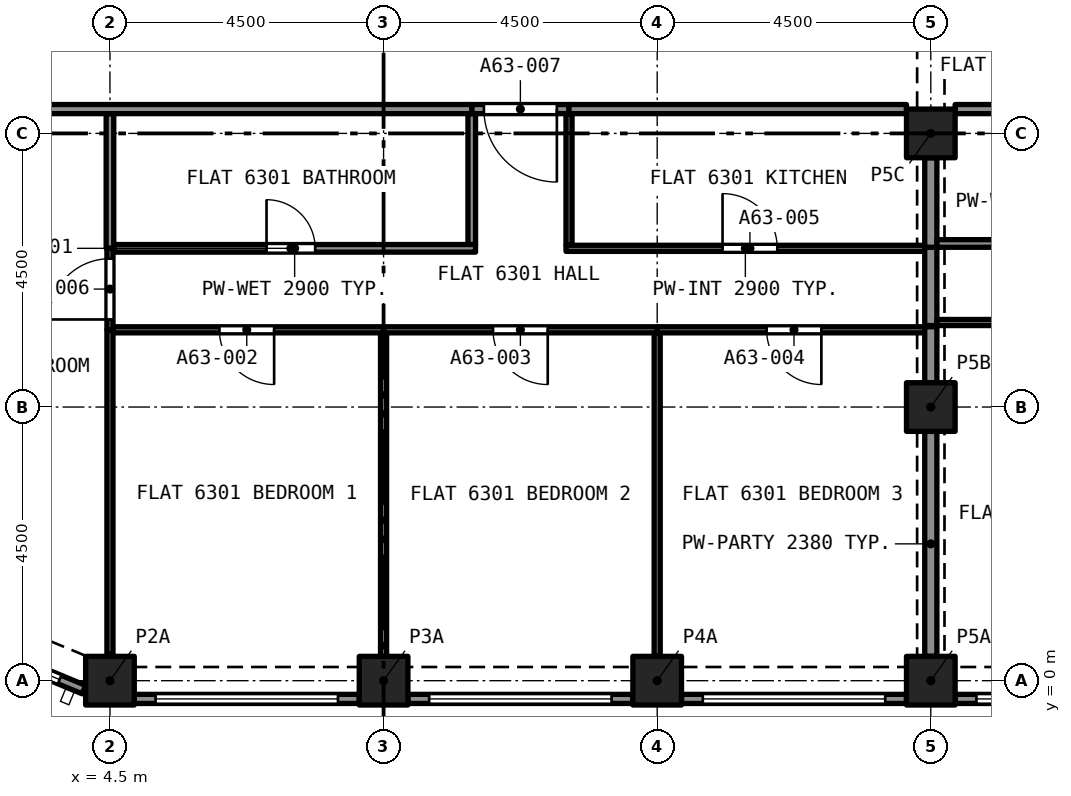
"""IFC4 building model, lengths in metres.
Left out: names, types, materials, properties, quantities, classifications, styles, units other than length and angle.
Written with IfcOpenShell. Run it as: python <this file> out.ifc"""

import sys

from ifc_helpers import new_model, si_unit, direction, frame, frame_2d, origin, origin_2d, place, context, subcontext, project, spatial, rectangle, extrude, element, fill, save


model = new_model("IFC4")
c1 = context("Model", 3, precision=1e-05, world=origin(), true_north=direction((0.0, 1.0)))
c2 = subcontext(c1, "Body", "Model", "MODEL_VIEW")
j1 = project(units=[si_unit("LENGTHUNIT", "METRE"), si_unit("PLANEANGLEUNIT", "RADIAN")], contexts=[c1])
p1 = place(None, origin())
s1 = spatial("IfcSite", under=j1, at=p1, CompositionType="ELEMENT")
p2 = place(p1, origin())
s2 = spatial("IfcBuilding", under=s1, at=p2, CompositionType="ELEMENT")
p3 = place(p2, frame((0.0, 0.0, 226.095)))
s3 = spatial("IfcBuildingStorey", under=s2, at=p3, CompositionType="ELEMENT", Elevation=226.095)
for number, where, z_axis, x_axis in (
    (1, (4.5, 0.0, 0.0), (0.0, 0.0, 1.0), (1.0, 0.0, 0.0)),
    (2, (9.0, 0.0, 0.0), (0.0, 0.0, 1.0), (1.0, 0.0, 0.0)),
    (3, (13.5, 0.0, 0.0), (0.0, 0.0, 1.0), (1.0, 0.0, 0.0)),
    (4, (18.0, 0.0, 0.0), (0.0, 0.0, 1.0), (1.0, 0.0, 0.0)),
    (5, (18.0, 4.5, 0.0), (0.0, 0.0, 1.0), (1.0, 0.0, 0.0)),
    (6, (18.0, 9.0, 0.0), (0.0, 0.0, 1.0), (1.0, 0.0, 0.0)),
):
    element("IfcColumn", number, at=place(p3, frame(where, z_axis=z_axis, x_axis=x_axis)), inside=s3, PredefinedType="COLUMN", context=c2, shape_type="SweptSolid", body=[
        extrude(rectangle(XDim=0.8, YDim=0.8, at=origin_2d()), origin(), (0.0, 0.0, 1.0), 3.2),
    ])
p4 = place(p3, frame((4.071, -0.147, 0.0), z_axis=(0.0, 0.0, 1.0), x_axis=(-0.923885342263, 0.382669406082, 0.0)))
e7 = element("IfcWall", 7, at=p4, inside=s3, PredefinedType="SOLIDWALL", context=c2, shape_type="SweptSolid", body=[
    extrude(rectangle(XDim=2.602, YDim=0.15, at=frame_2d((1.301, 0.0))), origin(), (0.0, 0.0, 1.0), 3.2),
])
p5 = place(p4, frame((0.432, 0.0, 0.45)))
e8 = element("IfcOpeningElement", 8, at=p5, cuts=e7, PredefinedType="OPENING", context=c2, shape_type="SweptSolid", body=[
    extrude(rectangle(XDim=1.9, YDim=1.95, at=frame_2d((0.95, 0.975))), frame((0.0, 0.085, 0.0), z_axis=(0.0, -1.0, 0.0), x_axis=(1.0, 0.0, 0.0)), (0.0, 0.0, 1.0), 0.17),
])
p6 = place(p3, frame((8.6, -0.3, 0.0), z_axis=(0.0, 0.0, 1.0), x_axis=(-1.0, 0.0, 0.0)))
e9 = element("IfcWall", 9, at=p6, inside=s3, PredefinedType="SOLIDWALL", context=c2, shape_type="SweptSolid", body=[
    extrude(rectangle(XDim=3.7, YDim=0.15, at=frame_2d((1.85, 0.0))), origin(), (0.0, 0.0, 1.0), 3.2),
])
p7 = place(p6, frame((0.35, 0.0, 0.45)))
e10 = element("IfcOpeningElement", 10, at=p7, cuts=e9, PredefinedType="OPENING", context=c2, shape_type="SweptSolid", body=[
    extrude(rectangle(XDim=3.0, YDim=1.95, at=frame_2d((1.5, 0.975))), frame((0.0, 0.085, 0.0), z_axis=(0.0, -1.0, 0.0), x_axis=(1.0, 0.0, 0.0)), (0.0, 0.0, 1.0), 0.17),
])
p8 = place(p3, frame((13.1, -0.3, 0.0), z_axis=(0.0, 0.0, 1.0), x_axis=(-1.0, 0.0, 0.0)))
e11 = element("IfcWall", 11, at=p8, inside=s3, PredefinedType="SOLIDWALL", context=c2, shape_type="SweptSolid", body=[
    extrude(rectangle(XDim=3.7, YDim=0.15, at=frame_2d((1.85, 0.0))), origin(), (0.0, 0.0, 1.0), 3.2),
])
p9 = place(p8, frame((0.35, 0.0, 0.45)))
e12 = element("IfcOpeningElement", 12, at=p9, cuts=e11, PredefinedType="OPENING", context=c2, shape_type="SweptSolid", body=[
    extrude(rectangle(XDim=3.0, YDim=1.95, at=frame_2d((1.5, 0.975))), frame((0.0, 0.085, 0.0), z_axis=(0.0, -1.0, 0.0), x_axis=(1.0, 0.0, 0.0)), (0.0, 0.0, 1.0), 0.17),
])
p10 = place(p3, frame((17.6, -0.3, 0.0), z_axis=(0.0, 0.0, 1.0), x_axis=(-1.0, 0.0, 0.0)))
e13 = element("IfcWall", 13, at=p10, inside=s3, PredefinedType="SOLIDWALL", context=c2, shape_type="SweptSolid", body=[
    extrude(rectangle(XDim=3.7, YDim=0.15, at=frame_2d((1.85, 0.0))), origin(), (0.0, 0.0, 1.0), 3.2),
])
p11 = place(p10, frame((0.35, 0.0, 0.45)))
e14 = element("IfcOpeningElement", 14, at=p11, cuts=e13, PredefinedType="OPENING", context=c2, shape_type="SweptSolid", body=[
    extrude(rectangle(XDim=3.0, YDim=1.95, at=frame_2d((1.5, 0.975))), frame((0.0, 0.085, 0.0), z_axis=(0.0, -1.0, 0.0), x_axis=(1.0, 0.0, 0.0)), (0.0, 0.0, 1.0), 0.17),
])
p12 = place(p3, frame((22.1, -0.3, 0.0), z_axis=(0.0, 0.0, 1.0), x_axis=(-1.0, 0.0, 0.0)))
e15 = element("IfcWall", 15, at=p12, inside=s3, PredefinedType="SOLIDWALL", context=c2, shape_type="SweptSolid", body=[
    extrude(rectangle(XDim=3.7, YDim=0.15, at=frame_2d((1.85, 0.0))), origin(), (0.0, 0.0, 1.0), 3.2),
])
p13 = place(p12, frame((0.35, 0.0, 0.45)))
e16 = element("IfcOpeningElement", 16, at=p13, cuts=e15, PredefinedType="OPENING", context=c2, shape_type="SweptSolid", body=[
    extrude(rectangle(XDim=3.0, YDim=1.95, at=frame_2d((1.5, 0.975))), frame((0.0, 0.085, 0.0), z_axis=(0.0, -1.0, 0.0), x_axis=(1.0, 0.0, 0.0)), (0.0, 0.0, 1.0), 0.17),
])
p14 = place(p3, frame((10.45, 7.173, 0.0), z_axis=(0.0, 0.0, 1.0), x_axis=(0.0, 1.0, 0.0)))
e17 = element("IfcWall", 17, at=p14, inside=s3, PredefinedType="PARTITIONING", context=c2, shape_type="SweptSolid", body=[
    extrude(rectangle(XDim=2.152, YDim=0.125, at=frame_2d((1.076, 0.0))), origin(), (0.0, 0.0, 1.0), 2.9),
])
p15 = place(p3, frame((4.562, 7.11, 0.0), z_axis=(0.0, 0.0, 1.0), x_axis=(1.0, 0.0, 0.0)))
e18 = element("IfcWall", 18, at=p15, inside=s3, PredefinedType="PARTITIONING", context=c2, shape_type="SweptSolid", body=[
    extrude(rectangle(XDim=5.95, YDim=0.125, at=frame_2d((2.975, 0.0))), origin(), (0.0, 0.0, 1.0), 2.9),
])
p16 = place(p15, frame((2.512, 0.0, 0.0)))
e19 = element("IfcOpeningElement", 19, at=p16, cuts=e18, PredefinedType="OPENING", context=c2, shape_type="SweptSolid", body=[
    extrude(rectangle(XDim=0.8, YDim=2.1, at=frame_2d((0.4, 1.05))), frame((0.0, 0.073, 0.0), z_axis=(0.0, -1.0, 0.0), x_axis=(1.0, 0.0, 0.0)), (0.0, 0.0, 1.0), 0.145),
])
p17 = place(p3, frame((4.5, 7.11, 0.0), z_axis=(0.0, 0.0, 1.0), x_axis=(0.0, 1.0, 0.0)))
e20 = element("IfcWall", 20, at=p17, inside=s3, PredefinedType="PARTITIONING", context=c2, shape_type="SweptSolid", body=[
    extrude(rectangle(XDim=2.215, YDim=0.125, at=frame_2d((1.107, 0.0))), origin(), (0.0, 0.0, 1.0), 2.9),
])
p18 = place(p3, frame((9.0, 0.4, 0.0), z_axis=(0.0, 0.0, 1.0), x_axis=(0.0, 1.0, 0.0)))
e21 = element("IfcWall", 21, at=p18, inside=s3, PredefinedType="PARTITIONING", context=c2, shape_type="SweptSolid", body=[
    extrude(rectangle(XDim=5.32, YDim=0.1, at=frame_2d((2.66, 0.0))), origin(), (0.0, 0.0, 1.0), 2.9),
])
p19 = place(p3, frame((9.0, 5.77, 0.0), z_axis=(0.0, 0.0, 1.0), x_axis=(-1.0, 0.0, 0.0)))
e22 = element("IfcWall", 22, at=p19, inside=s3, PredefinedType="PARTITIONING", context=c2, shape_type="SweptSolid", body=[
    extrude(rectangle(XDim=4.45, YDim=0.1, at=frame_2d((2.225, 0.0))), origin(), (0.0, 0.0, 1.0), 2.9),
])
p20 = place(p19, frame((1.8, 0.0, 0.0)))
e23 = element("IfcOpeningElement", 23, at=p20, cuts=e22, PredefinedType="OPENING", context=c2, shape_type="SweptSolid", body=[
    extrude(rectangle(XDim=0.9, YDim=2.1, at=frame_2d((0.45, 1.05))), frame((0.0, 0.06, 0.0), z_axis=(0.0, -1.0, 0.0), x_axis=(1.0, 0.0, 0.0)), (0.0, 0.0, 1.0), 0.12),
])
p21 = place(p3, frame((4.5, 0.433, 0.0), z_axis=(0.0, 0.0, 1.0), x_axis=(0.0, 1.0, 0.0)))
e24 = element("IfcWall", 24, at=p21, inside=s3, PredefinedType="PARTITIONING", context=c2, shape_type="SweptSolid", body=[
    extrude(rectangle(XDim=5.337, YDim=0.1, at=frame_2d((2.668, 0.0))), origin(), (0.0, 0.0, 1.0), 2.9),
])
p22 = place(p3, frame((13.5, 0.4, 0.0), z_axis=(0.0, 0.0, 1.0), x_axis=(0.0, 1.0, 0.0)))
e25 = element("IfcWall", 25, at=p22, inside=s3, PredefinedType="PARTITIONING", context=c2, shape_type="SweptSolid", body=[
    extrude(rectangle(XDim=5.32, YDim=0.1, at=frame_2d((2.66, 0.0))), origin(), (0.0, 0.0, 1.0), 2.9),
])
p23 = place(p3, frame((13.5, 5.77, 0.0), z_axis=(0.0, 0.0, 1.0), x_axis=(-1.0, 0.0, 0.0)))
e26 = element("IfcWall", 26, at=p23, inside=s3, PredefinedType="PARTITIONING", context=c2, shape_type="SweptSolid", body=[
    extrude(rectangle(XDim=4.5, YDim=0.1, at=frame_2d((2.25, 0.0))), origin(), (0.0, 0.0, 1.0), 2.9),
])
p24 = place(p23, frame((1.8, 0.0, 0.0)))
e27 = element("IfcOpeningElement", 27, at=p24, cuts=e26, PredefinedType="OPENING", context=c2, shape_type="SweptSolid", body=[
    extrude(rectangle(XDim=0.9, YDim=2.1, at=frame_2d((0.45, 1.05))), frame((0.0, 0.06, 0.0), z_axis=(0.0, -1.0, 0.0), x_axis=(1.0, 0.0, 0.0)), (0.0, 0.0, 1.0), 0.12),
])
p25 = place(p3, frame((17.9, 5.77, 0.0), z_axis=(0.0, 0.0, 1.0), x_axis=(-1.0, 0.0, 0.0)))
e28 = element("IfcWall", 28, at=p25, inside=s3, PredefinedType="PARTITIONING", context=c2, shape_type="SweptSolid", body=[
    extrude(rectangle(XDim=4.4, YDim=0.1, at=frame_2d((2.2, 0.0))), origin(), (0.0, 0.0, 1.0), 2.9),
])
p26 = place(p25, frame((1.7, 0.0, 0.0)))
e29 = element("IfcOpeningElement", 29, at=p26, cuts=e28, PredefinedType="OPENING", context=c2, shape_type="SweptSolid", body=[
    extrude(rectangle(XDim=0.9, YDim=2.1, at=frame_2d((0.45, 1.05))), frame((0.0, 0.06, 0.0), z_axis=(0.0, -1.0, 0.0), x_axis=(1.0, 0.0, 0.0)), (0.0, 0.0, 1.0), 0.12),
])
p27 = place(p3, frame((18.0, 4.9, 0.0), z_axis=(0.0, 0.0, 1.0), x_axis=(0.0, 1.0, 0.0)))
e30 = element("IfcWall", 30, at=p27, inside=s3, PredefinedType="PARTITIONING", context=c2, shape_type="SweptSolid", body=[
    extrude(rectangle(XDim=0.92, YDim=0.2, at=frame_2d((0.46, 0.0))), origin(), (0.0, 0.0, 1.0), 2.38),
])
p28 = place(p3, frame((18.0, 0.4, 0.0), z_axis=(0.0, 0.0, 1.0), x_axis=(0.0, 1.0, 0.0)))
e31 = element("IfcWall", 31, at=p28, inside=s3, PredefinedType="PARTITIONING", context=c2, shape_type="SweptSolid", body=[
    extrude(rectangle(XDim=3.7, YDim=0.2, at=frame_2d((1.85, 0.0))), origin(), (0.0, 0.0, 1.0), 2.38),
])
p29 = place(p3, frame((12.05, 7.16, 0.0), z_axis=(0.0, 0.0, 1.0), x_axis=(0.0, 1.0, 0.0)))
e32 = element("IfcWall", 32, at=p29, inside=s3, PredefinedType="PARTITIONING", context=c2, shape_type="SweptSolid", body=[
    extrude(rectangle(XDim=2.165, YDim=0.1, at=frame_2d((1.083, 0.0))), origin(), (0.0, 0.0, 1.0), 2.9),
])
p30 = place(p3, frame((12.0, 7.11, 0.0), z_axis=(0.0, 0.0, 1.0), x_axis=(1.0, 0.0, 0.0)))
e33 = element("IfcWall", 33, at=p30, inside=s3, PredefinedType="PARTITIONING", context=c2, shape_type="SweptSolid", body=[
    extrude(rectangle(XDim=5.9, YDim=0.1, at=frame_2d((2.95, 0.0))), origin(), (0.0, 0.0, 1.0), 2.9),
])
p31 = place(p30, frame((2.575, 0.0, 0.0)))
e34 = element("IfcOpeningElement", 34, at=p31, cuts=e33, PredefinedType="OPENING", context=c2, shape_type="SweptSolid", body=[
    extrude(rectangle(XDim=0.9, YDim=2.1, at=frame_2d((0.45, 1.05))), frame((0.0, 0.06, 0.0), z_axis=(0.0, -1.0, 0.0), x_axis=(1.0, 0.0, 0.0)), (0.0, 0.0, 1.0), 0.12),
])
p32 = place(p3, frame((4.5, 5.77, 0.0), z_axis=(0.0, 0.0, 1.0), x_axis=(0.0, 1.0, 0.0)))
e35 = element("IfcWall", 35, at=p32, inside=s3, PredefinedType="PARTITIONING", context=c2, shape_type="SweptSolid", body=[
    extrude(rectangle(XDim=1.34, YDim=0.1, at=frame_2d((0.67, 0.0))), origin(), (0.0, 0.0, 1.0), 2.9),
])
p33 = place(p32, frame((0.17, 0.0, 0.0)))
e36 = element("IfcOpeningElement", 36, at=p33, cuts=e35, PredefinedType="OPENING", context=c2, shape_type="SweptSolid", body=[
    extrude(rectangle(XDim=1.0, YDim=2.1, at=frame_2d((0.5, 1.05))), frame((0.0, 0.06, 0.0), z_axis=(0.0, -1.0, 0.0), x_axis=(1.0, 0.0, 0.0)), (0.0, 0.0, 1.0), 0.12),
])
p34 = place(p3, frame((18.0, 5.84, 0.0), z_axis=(0.0, 0.0, 1.0), x_axis=(0.0, 1.0, 0.0)))
e37 = element("IfcWall", 37, at=p34, inside=s3, PredefinedType="PARTITIONING", context=c2, shape_type="SweptSolid", body=[
    extrude(rectangle(XDim=1.32, YDim=0.2, at=frame_2d((0.66, 0.0))), origin(), (0.0, 0.0, 1.0), 2.38),
])
p35 = place(p3, frame((12.05, 9.4, 0.0), z_axis=(0.0, 0.0, 1.0), x_axis=(-1.0, 0.0, 0.0)))
e38 = element("IfcWall", 38, at=p35, inside=s3, PredefinedType="PARTITIONING", context=c2, shape_type="SweptSolid", body=[
    extrude(rectangle(XDim=1.6, YDim=0.15, at=frame_2d((0.8, 0.0))), origin(), (0.0, 0.0, 1.0), 2.9),
])
p36 = place(p35, frame((0.2, 0.0, 0.0)))
e39 = element("IfcOpeningElement", 39, at=p36, cuts=e38, PredefinedType="OPENING", context=c2, shape_type="SweptSolid", body=[
    extrude(rectangle(XDim=1.2, YDim=2.4, at=frame_2d((0.6, 1.2))), frame((0.0, 0.085, 0.0), z_axis=(0.0, -1.0, 0.0), x_axis=(1.0, 0.0, 0.0)), (0.0, 0.0, 1.0), 0.17),
])
p37 = place(p3, frame((18.0, 7.127, 0.0), z_axis=(0.0, 0.0, 1.0), x_axis=(0.0, 1.0, 0.0)))
e40 = element("IfcWall", 40, at=p37, inside=s3, PredefinedType="PARTITIONING", context=c2, shape_type="SweptSolid", body=[
    extrude(rectangle(XDim=1.473, YDim=0.2, at=frame_2d((0.736, 0.0))), origin(), (0.0, 0.0, 1.0), 2.38),
])
p38 = place(p3, frame((12.05, 9.4, 0.0), z_axis=(0.0, 0.0, 1.0), x_axis=(1.0, 0.0, 0.0)))
e41 = element("IfcWall", 41, at=p38, inside=s3, PredefinedType="PARTITIONING", context=c2, shape_type="SweptSolid", body=[
    extrude(rectangle(XDim=5.55, YDim=0.15, at=frame_2d((2.775, 0.0))), origin(), (0.0, 0.0, 1.0), 2.9),
])
p39 = place(p3, frame((0.4, 9.4, 0.0), z_axis=(0.0, 0.0, 1.0), x_axis=(1.0, 0.0, 0.0)))
e42 = element("IfcWall", 42, at=p39, inside=s3, PredefinedType="PARTITIONING", context=c2, shape_type="SweptSolid", body=[
    extrude(rectangle(XDim=10.05, YDim=0.15, at=frame_2d((5.025, 0.0))), origin(), (0.0, 0.0, 1.0), 2.9),
])
p40 = place(p3, frame((18.1, 7.19, 0.0), z_axis=(0.0, 0.0, 1.0), x_axis=(1.0, 0.0, 0.0)))
e43 = element("IfcWall", 43, at=p40, inside=s3, PredefinedType="PARTITIONING", context=c2, shape_type="SweptSolid", body=[
    extrude(rectangle(XDim=3.662, YDim=0.125, at=frame_2d((1.831, 0.0))), origin(), (0.0, 0.0, 1.0), 2.75),
])
p41 = place(p40, frame((1.35, 0.0, 0.0)))
e44 = element("IfcOpeningElement", 44, at=p41, cuts=e43, PredefinedType="OPENING", context=c2, shape_type="SweptSolid", body=[
    extrude(rectangle(XDim=0.8, YDim=2.1, at=frame_2d((0.4, 1.05))), frame((0.0, 0.073, 0.0), z_axis=(0.0, -1.0, 0.0), x_axis=(1.0, 0.0, 0.0)), (0.0, 0.0, 1.0), 0.145),
])
p42 = place(p3, frame((18.4, 9.4, 0.0), z_axis=(0.0, 0.0, 1.0), x_axis=(1.0, 0.0, 0.0)))
e45 = element("IfcWall", 45, at=p42, inside=s3, PredefinedType="PARTITIONING", context=c2, shape_type="SweptSolid", body=[
    extrude(rectangle(XDim=3.3, YDim=0.15, at=frame_2d((1.65, 0.0))), origin(), (0.0, 0.0, 1.0), 2.75),
])
p43 = place(p3, frame((22.5, 5.89, 0.0), z_axis=(0.0, 0.0, 1.0), x_axis=(-1.0, 0.0, 0.0)))
e46 = element("IfcWall", 46, at=p43, inside=s3, PredefinedType="PARTITIONING", context=c2, shape_type="SweptSolid", body=[
    extrude(rectangle(XDim=4.4, YDim=0.1, at=frame_2d((2.2, 0.0))), origin(), (0.0, 0.0, 1.0), 2.75),
])
p44 = place(p43, frame((1.8, 0.0, 0.0)))
e47 = element("IfcOpeningElement", 47, at=p44, cuts=e46, PredefinedType="OPENING", context=c2, shape_type="SweptSolid", body=[
    extrude(rectangle(XDim=0.9, YDim=2.1, at=frame_2d((0.45, 1.05))), frame((0.0, 0.06, 0.0), z_axis=(0.0, -1.0, 0.0), x_axis=(1.0, 0.0, 0.0)), (0.0, 0.0, 1.0), 0.12),
])
p45 = place(p5, origin())
e48 = element("IfcWindow", 48, at=p45, inside=s3, PartitioningType="SINGLE_PANEL", PredefinedType="WINDOW", context=c2, shape_type="SweptSolid", body=[
    extrude(rectangle(XDim=1.9, YDim=1.95, at=frame_2d((0.95, 0.975))), frame((0.0, 0.03, 0.0), z_axis=(0.0, -1.0, 0.0), x_axis=(1.0, 0.0, 0.0)), (0.0, 0.0, 1.0), 0.06),
])
fill(e8, e48)
p46 = place(p7, origin())
e49 = element("IfcWindow", 49, at=p46, inside=s3, PartitioningType="SINGLE_PANEL", PredefinedType="WINDOW", context=c2, shape_type="SweptSolid", body=[
    extrude(rectangle(XDim=3.0, YDim=1.95, at=frame_2d((1.5, 0.975))), frame((0.0, 0.03, 0.0), z_axis=(0.0, -1.0, 0.0), x_axis=(1.0, 0.0, 0.0)), (0.0, 0.0, 1.0), 0.06),
])
fill(e10, e49)
p47 = place(p9, origin())
e50 = element("IfcWindow", 50, at=p47, inside=s3, PartitioningType="SINGLE_PANEL", PredefinedType="WINDOW", context=c2, shape_type="SweptSolid", body=[
    extrude(rectangle(XDim=3.0, YDim=1.95, at=frame_2d((1.5, 0.975))), frame((0.0, 0.03, 0.0), z_axis=(0.0, -1.0, 0.0), x_axis=(1.0, 0.0, 0.0)), (0.0, 0.0, 1.0), 0.06),
])
fill(e12, e50)
p48 = place(p11, origin())
e51 = element("IfcWindow", 51, at=p48, inside=s3, PartitioningType="SINGLE_PANEL", PredefinedType="WINDOW", context=c2, shape_type="SweptSolid", body=[
    extrude(rectangle(XDim=3.0, YDim=1.95, at=frame_2d((1.5, 0.975))), frame((0.0, 0.03, 0.0), z_axis=(0.0, -1.0, 0.0), x_axis=(1.0, 0.0, 0.0)), (0.0, 0.0, 1.0), 0.06),
])
fill(e14, e51)
p49 = place(p13, origin())
e52 = element("IfcWindow", 52, at=p49, inside=s3, PartitioningType="SINGLE_PANEL", PredefinedType="WINDOW", context=c2, shape_type="SweptSolid", body=[
    extrude(rectangle(XDim=3.0, YDim=1.95, at=frame_2d((1.5, 0.975))), frame((0.0, 0.03, 0.0), z_axis=(0.0, -1.0, 0.0), x_axis=(1.0, 0.0, 0.0)), (0.0, 0.0, 1.0), 0.06),
])
fill(e16, e52)
p50 = place(p16, origin())
e53 = element("IfcDoor", 53, at=p50, inside=s3, OperationType="SINGLE_SWING_LEFT", PredefinedType="DOOR", context=c2, shape_type="SweptSolid", body=[
    extrude(rectangle(XDim=0.8, YDim=2.1, at=frame_2d((0.4, 1.05))), frame((0.0, 0.025, 0.0), z_axis=(0.0, -1.0, 0.0), x_axis=(1.0, 0.0, 0.0)), (0.0, 0.0, 1.0), 0.05),
])
fill(e19, e53)
p51 = place(p20, origin())
e54 = element("IfcDoor", 54, at=p51, inside=s3, OperationType="SINGLE_SWING_RIGHT", PredefinedType="DOOR", context=c2, shape_type="SweptSolid", body=[
    extrude(rectangle(XDim=0.9, YDim=2.1, at=frame_2d((0.45, 1.05))), frame((0.0, 0.025, 0.0), z_axis=(0.0, -1.0, 0.0), x_axis=(1.0, 0.0, 0.0)), (0.0, 0.0, 1.0), 0.05),
])
fill(e23, e54)
p52 = place(p24, origin())
e55 = element("IfcDoor", 55, at=p52, inside=s3, OperationType="SINGLE_SWING_LEFT", PredefinedType="DOOR", context=c2, shape_type="SweptSolid", body=[
    extrude(rectangle(XDim=0.9, YDim=2.1, at=frame_2d((0.45, 1.05))), frame((0.0, 0.025, 0.0), z_axis=(0.0, -1.0, 0.0), x_axis=(1.0, 0.0, 0.0)), (0.0, 0.0, 1.0), 0.05),
])
fill(e27, e55)
p53 = place(p26, origin())
e56 = element("IfcDoor", 56, at=p53, inside=s3, OperationType="SINGLE_SWING_LEFT", PredefinedType="DOOR", context=c2, shape_type="SweptSolid", body=[
    extrude(rectangle(XDim=0.9, YDim=2.1, at=frame_2d((0.45, 1.05))), frame((0.0, 0.025, 0.0), z_axis=(0.0, -1.0, 0.0), x_axis=(1.0, 0.0, 0.0)), (0.0, 0.0, 1.0), 0.05),
])
fill(e29, e56)
p54 = place(p31, origin())
e57 = element("IfcDoor", 57, at=p54, inside=s3, OperationType="SINGLE_SWING_RIGHT", PredefinedType="DOOR", context=c2, shape_type="SweptSolid", body=[
    extrude(rectangle(XDim=0.9, YDim=2.1, at=frame_2d((0.45, 1.05))), frame((0.0, 0.025, 0.0), z_axis=(0.0, -1.0, 0.0), x_axis=(1.0, 0.0, 0.0)), (0.0, 0.0, 1.0), 0.05),
])
fill(e34, e57)
p55 = place(p33, origin())
e58 = element("IfcDoor", 58, at=p55, inside=s3, OperationType="SINGLE_SWING_RIGHT", PredefinedType="DOOR", context=c2, shape_type="SweptSolid", body=[
    extrude(rectangle(XDim=1.0, YDim=2.1, at=frame_2d((0.5, 1.05))), frame((0.0, 0.025, 0.0), z_axis=(0.0, -1.0, 0.0), x_axis=(1.0, 0.0, 0.0)), (0.0, 0.0, 1.0), 0.05),
])
fill(e36, e58)
p56 = place(p36, origin())
e59 = element("IfcDoor", 59, at=p56, inside=s3, OperationType="SINGLE_SWING_LEFT", PredefinedType="DOOR", context=c2, shape_type="SweptSolid", body=[
    extrude(rectangle(XDim=1.2, YDim=2.4, at=frame_2d((0.6, 1.2))), frame((0.0, 0.025, 0.0), z_axis=(0.0, -1.0, 0.0), x_axis=(1.0, 0.0, 0.0)), (0.0, 0.0, 1.0), 0.05),
])
fill(e39, e59)
save(model, sys.argv[1])
